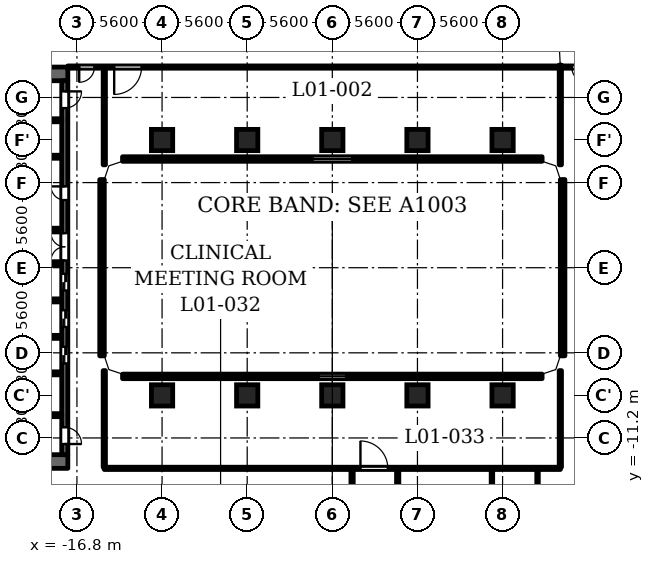
"""IFC4 building model, lengths in metres.
Left out: names, types, materials, properties, quantities, classifications, styles, units other than length and angle.
Written with IfcOpenShell. Run it as: python <this file> out.ifc"""

import sys

from ifc_helpers import new_model, si_unit, direction, frame, frame_2d, origin, origin_2d, place, context, subcontext, project, spatial, polyline, rectangle, outline, extrude, element, fill, save


model = new_model("IFC4")
c1 = context("Model", 3, precision=1e-05, world=origin(), true_north=direction((0.0, 1.0)))
c2 = subcontext(c1, "Body", "Model", "MODEL_VIEW")
j1 = project(units=[si_unit("LENGTHUNIT", "METRE"), si_unit("PLANEANGLEUNIT", "RADIAN")], contexts=[c1])
p1 = place(None, origin())
s1 = spatial("IfcSite", under=j1, at=p1, CompositionType="ELEMENT")
p2 = place(p1, origin())
s2 = spatial("IfcBuilding", under=s1, at=p2, CompositionType="ELEMENT")
p3 = place(p2, frame((0.0, 0.0, 6.5)))
s3 = spatial("IfcBuildingStorey", under=s2, at=p3, CompositionType="ELEMENT", Elevation=6.5)
for number, where, z_axis, x_axis in (
    (1, (-11.2, -8.4, 0.0), (0.0, 0.0, 1.0), (1.0, 0.0, 0.0)),
    (2, (-11.2, 8.4, 0.0), (0.0, 0.0, 1.0), (1.0, 0.0, 0.0)),
    (3, (-5.6, -8.4, 0.0), (0.0, 0.0, 1.0), (1.0, 0.0, 0.0)),
    (4, (-5.6, 8.4, 0.0), (0.0, 0.0, 1.0), (1.0, 0.0, 0.0)),
    (5, (0.0, -8.4, 0.0), (0.0, 0.0, 1.0), (1.0, 0.0, 0.0)),
    (6, (0.0, 8.4, 0.0), (0.0, 0.0, 1.0), (1.0, 0.0, 0.0)),
    (7, (5.6, -8.4, 0.0), (0.0, 0.0, 1.0), (1.0, 0.0, 0.0)),
    (8, (5.6, 8.4, 0.0), (0.0, 0.0, 1.0), (1.0, 0.0, 0.0)),
    (9, (11.2, -8.4, 0.0), (0.0, 0.0, 1.0), (1.0, 0.0, 0.0)),
    (10, (11.2, 8.4, 0.0), (0.0, 0.0, 1.0), (1.0, 0.0, 0.0)),
):
    element("IfcColumn", number, at=place(p3, frame(where, z_axis=z_axis, x_axis=x_axis)), inside=s3, PredefinedType="COLUMN", context=c2, shape_type="SweptSolid", body=[
        extrude(rectangle(XDim=1.4, YDim=1.4, at=origin_2d()), origin(), (0.0, 0.0, 1.0), 4.8),
    ])
p4 = place(p3, frame((-15.15, -5.8, 0.0), z_axis=(0.0, 0.0, 1.0), x_axis=(0.0, 1.0, 0.0)))
e11 = element("IfcWall", 11, at=p4, inside=s3, PredefinedType="SOLIDWALL", context=c2, shape_type="SweptSolid", body=[
    extrude(rectangle(XDim=11.6, YDim=0.3, at=frame_2d((5.8, 0.0))), origin(), (0.0, 0.0, 1.0), 4.45),
])
p5 = place(p3, frame((-13.8, 7.15, 0.0), z_axis=(0.0, 0.0, 1.0), x_axis=(1.0, 0.0, 0.0)))
e12 = element("IfcWall", 12, at=p5, inside=s3, PredefinedType="SOLIDWALL", context=c2, shape_type="SweptSolid", body=[
    extrude(rectangle(XDim=27.6, YDim=0.3, at=frame_2d((13.8, 0.0))), origin(), (0.0, 0.0, 1.0), 4.45),
])
p6 = place(p5, frame((12.5, 0.0, 0.9)))
e13 = element("IfcOpeningElement", 13, at=p6, cuts=e12, PredefinedType="OPENING", context=c2, shape_type="SweptSolid", body=[
    extrude(rectangle(XDim=2.6, YDim=1.25, at=frame_2d((1.3, 0.625))), frame((0.0, 0.16, 0.0), z_axis=(0.0, -1.0, 0.0), x_axis=(1.0, 0.0, 0.0)), (0.0, 0.0, 1.0), 0.32),
])
p7 = place(p3, frame((15.15, 5.8, 0.0), z_axis=(0.0, 0.0, 1.0), x_axis=(0.0, -1.0, 0.0)))
e14 = element("IfcWall", 14, at=p7, inside=s3, PredefinedType="SOLIDWALL", context=c2, shape_type="SweptSolid", body=[
    extrude(rectangle(XDim=11.6, YDim=0.3, at=frame_2d((5.8, 0.0))), origin(), (0.0, 0.0, 1.0), 4.45),
])
p8 = place(p3, frame((13.8, -7.15, 0.0), z_axis=(0.0, 0.0, 1.0), x_axis=(-1.0, 0.0, 0.0)))
e15 = element("IfcWall", 15, at=p8, inside=s3, PredefinedType="SOLIDWALL", context=c2, shape_type="SweptSolid", body=[
    extrude(rectangle(XDim=27.6, YDim=0.3, at=frame_2d((13.8, 0.0))), origin(), (0.0, 0.0, 1.0), 4.45),
])
p9 = place(p8, frame((12.9, 0.0, 0.9)))
e16 = element("IfcOpeningElement", 16, at=p9, cuts=e15, PredefinedType="OPENING", context=c2, shape_type="SweptSolid", body=[
    extrude(rectangle(XDim=1.8, YDim=1.25, at=frame_2d((0.9, 0.625))), frame((0.0, 0.16, 0.0), z_axis=(0.0, -1.0, 0.0), x_axis=(1.0, 0.0, 0.0)), (0.0, 0.0, 1.0), 0.32),
])
for number, where, z_axis, x_axis in (
    (17, (-17.4, 12.75, 0.0), (0.0, 0.0, 1.0), (-1.0, 0.0, 0.0)),
    (18, (-17.4, -12.75, 0.0), (0.0, 0.0, 1.0), (-1.0, 0.0, 0.0)),
):
    element("IfcWall", number, at=place(p3, frame(where, z_axis=z_axis, x_axis=x_axis)), inside=s3, PredefinedType="SHEAR", context=c2, shape_type="SweptSolid", body=[
        extrude(rectangle(XDim=10.4, YDim=0.9, at=frame_2d((5.2, 0.0))), origin(), (0.0, 0.0, 1.0), 4.45),
    ])
p10 = place(p3, frame((-17.6, -12.3, 0.0), z_axis=(0.0, 0.0, 1.0), x_axis=(0.0, 1.0, 0.0)))
e19 = element("IfcWall", 19, at=p10, inside=s3, PredefinedType="SHEAR", context=c2, shape_type="SweptSolid", body=[
    extrude(rectangle(XDim=24.6, YDim=0.4, at=frame_2d((12.3, 0.0))), origin(), (0.0, 0.0, 1.0), 4.45),
])
p11 = place(p10, frame((6.0, 0.0, 0.0)))
e20 = element("IfcOpeningElement", 20, at=p11, cuts=e19, PredefinedType="OPENING", context=c2, shape_type="SweptSolid", body=[
    extrude(rectangle(XDim=1.1, YDim=2.1, at=frame_2d((0.55, 1.05))), frame((0.0, 0.21, 0.0), z_axis=(0.0, -1.0, 0.0), x_axis=(1.0, 0.0, 0.0)), (0.0, 0.0, 1.0), 0.42),
])
p12 = place(p10, frame((8.4, 0.0, 0.0)))
e21 = element("IfcOpeningElement", 21, at=p12, cuts=e19, PredefinedType="OPENING", context=c2, shape_type="SweptSolid", body=[
    extrude(rectangle(XDim=1.1, YDim=2.1, at=frame_2d((0.55, 1.05))), frame((0.0, 0.21, 0.0), z_axis=(0.0, -1.0, 0.0), x_axis=(1.0, 0.0, 0.0)), (0.0, 0.0, 1.0), 0.42),
])
p13 = place(p10, frame((10.8, 0.0, 0.0)))
e22 = element("IfcOpeningElement", 22, at=p13, cuts=e19, PredefinedType="OPENING", context=c2, shape_type="SweptSolid", body=[
    extrude(rectangle(XDim=1.1, YDim=2.1, at=frame_2d((0.55, 1.05))), frame((0.0, 0.21, 0.0), z_axis=(0.0, -1.0, 0.0), x_axis=(1.0, 0.0, 0.0)), (0.0, 0.0, 1.0), 0.42),
])
p14 = place(p10, frame((16.75, 0.0, 0.0)))
e23 = element("IfcOpeningElement", 23, at=p14, cuts=e19, PredefinedType="OPENING", context=c2, shape_type="SweptSolid", body=[
    extrude(rectangle(XDim=0.9, YDim=2.1, at=frame_2d((0.45, 1.05))), frame((0.0, 0.21, 0.0), z_axis=(0.0, -1.0, 0.0), x_axis=(1.0, 0.0, 0.0)), (0.0, 0.0, 1.0), 0.42),
])
p15 = place(p10, frame((22.8, 0.0, 0.0)))
e24 = element("IfcOpeningElement", 24, at=p15, cuts=e19, PredefinedType="OPENING", context=c2, shape_type="SweptSolid", body=[
    extrude(rectangle(XDim=1.1, YDim=2.1, at=frame_2d((0.55, 1.05))), frame((0.0, 0.21, 0.0), z_axis=(0.0, -1.0, 0.0), x_axis=(1.0, 0.0, 0.0)), (0.0, 0.0, 1.0), 0.42),
])
p16 = place(p10, frame((0.7, 0.0, 0.0)))
e25 = element("IfcOpeningElement", 25, at=p16, cuts=e19, PredefinedType="OPENING", context=c2, shape_type="SweptSolid", body=[
    extrude(rectangle(XDim=1.1, YDim=2.1, at=frame_2d((0.55, 1.05))), frame((0.0, 0.21, 0.0), z_axis=(0.0, -1.0, 0.0), x_axis=(1.0, 0.0, 0.0)), (0.0, 0.0, 1.0), 0.42),
])
p17 = place(p10, frame((12.775, 0.0, 0.0)))
e26 = element("IfcOpeningElement", 26, at=p17, cuts=e19, PredefinedType="OPENING", context=c2, shape_type="SweptSolid", body=[
    extrude(rectangle(XDim=1.8, YDim=2.1, at=frame_2d((0.9, 1.05))), frame((0.0, 0.21, 0.0), z_axis=(0.0, -1.0, 0.0), x_axis=(1.0, 0.0, 0.0)), (0.0, 0.0, 1.0), 0.42),
])
p18 = place(p3, frame((-17.8, -9.7, 0.0), z_axis=(0.0, 0.0, 1.0), x_axis=(-1.0, 0.0, 0.0)))
e27 = element("IfcWall", 27, at=p18, inside=s3, PredefinedType="SHEAR", context=c2, shape_type="SweptSolid", body=[
    extrude(rectangle(XDim=8.3, YDim=0.2, at=frame_2d((4.15, 0.0))), origin(), (0.0, 0.0, 1.0), 4.45),
])
p19 = place(p18, frame((0.85, 0.0, 0.0)))
e28 = element("IfcOpeningElement", 28, at=p19, cuts=e27, PredefinedType="OPENING", context=c2, shape_type="SweptSolid", body=[
    extrude(rectangle(XDim=1.1, YDim=2.1, at=frame_2d((0.55, 1.05))), frame((0.0, 0.11, 0.0), z_axis=(0.0, -1.0, 0.0), x_axis=(1.0, 0.0, 0.0)), (0.0, 0.0, 1.0), 0.22),
])
p20 = place(p18, frame((3.75, 0.0, 0.0)))
e29 = element("IfcOpeningElement", 29, at=p20, cuts=e27, PredefinedType="OPENING", context=c2, shape_type="SweptSolid", body=[
    extrude(rectangle(XDim=1.1, YDim=2.1, at=frame_2d((0.55, 1.05))), frame((0.0, 0.11, 0.0), z_axis=(0.0, -1.0, 0.0), x_axis=(1.0, 0.0, 0.0)), (0.0, 0.0, 1.0), 0.22),
])
for number, where, z_axis, x_axis in (
    (30, (-17.8, -6.95, 0.0), (0.0, 0.0, 1.0), (-1.0, 0.0, 0.0)),
    (31, (-17.8, -4.55, 0.0), (0.0, 0.0, 1.0), (-1.0, 0.0, 0.0)),
    (32, (-17.8, -2.15, 0.0), (0.0, 0.0, 1.0), (-1.0, 0.0, 0.0)),
):
    element("IfcWall", number, at=place(p3, frame(where, z_axis=z_axis, x_axis=x_axis)), inside=s3, PredefinedType="PARTITIONING", context=c2, shape_type="SweptSolid", body=[
        extrude(rectangle(XDim=2.8, YDim=0.2, at=frame_2d((1.4, 0.0))), origin(), (0.0, 0.0, 1.0), 4.45),
    ])
for number, where, z_axis, x_axis in (
    (33, (-17.8, 0.25, 0.0), (0.0, 0.0, 1.0), (-1.0, 0.0, 0.0)),
    (34, (-17.8, 2.5, 0.0), (0.0, 0.0, 1.0), (-1.0, 0.0, 0.0)),
):
    element("IfcWall", number, at=place(p3, frame(where, z_axis=z_axis, x_axis=x_axis)), inside=s3, PredefinedType="PARTITIONING", context=c2, shape_type="SweptSolid", body=[
        extrude(rectangle(XDim=3.0, YDim=0.2, at=frame_2d((1.5, 0.0))), origin(), (0.0, 0.0, 1.0), 4.45),
    ])
p21 = place(p3, frame((-17.8, 7.3, 0.0), z_axis=(0.0, 0.0, 1.0), x_axis=(-1.0, 0.0, 0.0)))
e35 = element("IfcWall", 35, at=p21, inside=s3, PredefinedType="PARTITIONING", context=c2, shape_type="SweptSolid", body=[
    extrude(rectangle(XDim=2.8, YDim=0.2, at=frame_2d((1.4, 0.0))), origin(), (0.0, 0.0, 1.0), 4.45),
])
p22 = place(p3, frame((-17.8, 9.7, 0.0), z_axis=(0.0, 0.0, 1.0), x_axis=(-1.0, 0.0, 0.0)))
e36 = element("IfcWall", 36, at=p22, inside=s3, PredefinedType="SHEAR", context=c2, shape_type="SweptSolid", body=[
    extrude(rectangle(XDim=8.3, YDim=0.2, at=frame_2d((4.15, 0.0))), origin(), (0.0, 0.0, 1.0), 4.45),
])
p23 = place(p22, frame((0.85, 0.0, 0.0)))
e37 = element("IfcOpeningElement", 37, at=p23, cuts=e36, PredefinedType="OPENING", context=c2, shape_type="SweptSolid", body=[
    extrude(rectangle(XDim=1.1, YDim=2.1, at=frame_2d((0.55, 1.05))), frame((0.0, 0.11, 0.0), z_axis=(0.0, -1.0, 0.0), x_axis=(1.0, 0.0, 0.0)), (0.0, 0.0, 1.0), 0.22),
])
p24 = place(p22, frame((3.75, 0.0, 0.0)))
e38 = element("IfcOpeningElement", 38, at=p24, cuts=e36, PredefinedType="OPENING", context=c2, shape_type="SweptSolid", body=[
    extrude(rectangle(XDim=1.1, YDim=2.1, at=frame_2d((0.55, 1.05))), frame((0.0, 0.11, 0.0), z_axis=(0.0, -1.0, 0.0), x_axis=(1.0, 0.0, 0.0)), (0.0, 0.0, 1.0), 0.22),
])
p25 = place(p3, frame((-15.005, -13.2, 0.0), z_axis=(0.0, 0.0, 1.0), x_axis=(1.0, 0.0, 0.0)))
e39 = element("IfcWall", 39, at=p25, inside=s3, PredefinedType="PARTITIONING", context=c2, shape_type="SweptSolid", body=[
    extrude(rectangle(XDim=30.01, YDim=0.15, at=frame_2d((15.005, 0.0))), origin(), (0.0, 0.0, 1.0), 4.45),
])
p26 = place(p25, frame((16.855, 0.0, 0.0)))
e40 = element("IfcOpeningElement", 40, at=p26, cuts=e39, PredefinedType="OPENING", context=c2, shape_type="SweptSolid", body=[
    extrude(rectangle(XDim=1.8, YDim=2.1, at=frame_2d((0.9, 1.05))), frame((0.0, 0.085, 0.0), z_axis=(0.0, -1.0, 0.0), x_axis=(1.0, 0.0, 0.0)), (0.0, 0.0, 1.0), 0.17),
])
p27 = place(p3, frame((-17.4, 13.2, 0.0), z_axis=(0.0, 0.0, 1.0), x_axis=(1.0, 0.0, 0.0)))
e41 = element("IfcWall", 41, at=p27, inside=s3, PredefinedType="PARTITIONING", context=c2, shape_type="SweptSolid", body=[
    extrude(rectangle(XDim=34.8, YDim=0.15, at=frame_2d((17.4, 0.0))), origin(), (0.0, 0.0, 1.0), 4.45),
])
p28 = place(p27, frame((3.05, 0.0, 0.0)))
e42 = element("IfcOpeningElement", 42, at=p28, cuts=e41, PredefinedType="OPENING", context=c2, shape_type="SweptSolid", body=[
    extrude(rectangle(XDim=1.8, YDim=2.1, at=frame_2d((0.9, 1.05))), frame((0.0, 0.085, 0.0), z_axis=(0.0, -1.0, 0.0), x_axis=(1.0, 0.0, 0.0)), (0.0, 0.0, 1.0), 0.17),
])
p29 = place(p27, frame((0.75, 0.0, 0.0)))
e43 = element("IfcOpeningElement", 43, at=p29, cuts=e41, PredefinedType="OPENING", context=c2, shape_type="SweptSolid", body=[
    extrude(rectangle(XDim=1.0, YDim=2.1, at=frame_2d((0.5, 1.05))), frame((0.0, 0.085, 0.0), z_axis=(0.0, -1.0, 0.0), x_axis=(1.0, 0.0, 0.0)), (0.0, 0.0, 1.0), 0.17),
])
p30 = place(p27, frame((33.15, 0.0, 0.0)))
e44 = element("IfcOpeningElement", 44, at=p30, cuts=e41, PredefinedType="OPENING", context=c2, shape_type="SweptSolid", body=[
    extrude(rectangle(XDim=1.0, YDim=2.1, at=frame_2d((0.5, 1.05))), frame((0.0, 0.085, 0.0), z_axis=(0.0, -1.0, 0.0), x_axis=(1.0, 0.0, 0.0)), (0.0, 0.0, 1.0), 0.17),
])
for number, where, z_axis, x_axis in (
    (45, (-15.0, -13.125, 0.0), (0.0, 0.0, 1.0), (0.0, 1.0, 0.0)),
    (46, (-15.0, 6.769, 0.0), (0.0, 0.0, 1.0), (0.0, 1.0, 0.0)),
):
    element("IfcWall", number, at=place(p3, frame(where, z_axis=z_axis, x_axis=x_axis)), inside=s3, PredefinedType="PARTITIONING", context=c2, shape_type="SweptSolid", body=[
        extrude(rectangle(XDim=6.356, YDim=0.15, at=frame_2d((3.178, 0.0))), origin(), (0.0, 0.0, 1.0), 4.45),
    ])
for number, where, z_axis, x_axis in (
    (47, (1.3, -22.325, 0.0), (0.0, 0.0, 1.0), (0.0, 1.0, 0.0)),
    (48, (4.3, -22.325, 0.0), (0.0, 0.0, 1.0), (0.0, 1.0, 0.0)),
):
    element("IfcWall", number, at=place(p3, frame(where, z_axis=z_axis, x_axis=x_axis)), inside=s3, PredefinedType="PARTITIONING", context=c2, shape_type="SweptSolid", body=[
        extrude(rectangle(XDim=9.05, YDim=0.15, at=frame_2d((4.525, 0.0))), origin(), (0.0, 0.0, 1.0), 4.45),
    ])
for number, where, z_axis, x_axis in (
    (49, (10.5, -22.325, 0.0), (0.0, 0.0, 1.0), (0.0, 1.0, 0.0)),
    (50, (13.5, -22.325, 0.0), (0.0, 0.0, 1.0), (0.0, 1.0, 0.0)),
):
    element("IfcWall", number, at=place(p3, frame(where, z_axis=z_axis, x_axis=x_axis)), inside=s3, PredefinedType="PARTITIONING", context=c2, shape_type="SweptSolid", body=[
        extrude(rectangle(XDim=9.05, YDim=0.1, at=frame_2d((4.525, 0.0))), origin(), (0.0, 0.0, 1.0), 4.45),
    ])
for number, where, z_axis, x_axis in (
    (51, (15.0, -13.125, 0.0), (0.0, 0.0, 1.0), (0.0, 1.0, 0.0)),
    (52, (15.0, 6.769, 0.0), (0.0, 0.0, 1.0), (0.0, 1.0, 0.0)),
):
    element("IfcWall", number, at=place(p3, frame(where, z_axis=z_axis, x_axis=x_axis)), inside=s3, PredefinedType="PARTITIONING", context=c2, shape_type="SweptSolid", body=[
        extrude(rectangle(XDim=6.356, YDim=0.15, at=frame_2d((3.178, 0.0))), origin(), (0.0, 0.0, 1.0), 4.45),
    ])
p31 = place(p3, origin())
e53 = element("IfcWall", 53, at=p31, inside=s3, PredefinedType="SOLIDWALL", context=c2, shape_type="SweptSolid", body=[
    extrude(outline(polyline([(-13.849, 7.3), (-14.937, 6.937), (-15.3, 5.849), (-15.3, 5.8), (-15.0, 5.8), (-14.7, 6.7), (-13.8, 7.0), (-13.8, 7.3), (-13.849, 7.3)])), origin(), (0.0, 0.0, 1.0), 4.45),
])
e54 = element("IfcWall", 54, at=p31, inside=s3, PredefinedType="SOLIDWALL", context=c2, shape_type="SweptSolid", body=[
    extrude(outline(polyline([(14.937, 6.937), (13.849, 7.3), (13.8, 7.3), (13.8, 7.0), (14.7, 6.7), (15.0, 5.8), (15.3, 5.8), (15.3, 5.849), (14.937, 6.937)])), origin(), (0.0, 0.0, 1.0), 4.45),
])
e55 = element("IfcWall", 55, at=p31, inside=s3, PredefinedType="SOLIDWALL", context=c2, shape_type="SweptSolid", body=[
    extrude(outline(polyline([(14.937, -6.937), (15.3, -5.849), (15.3, -5.8), (15.0, -5.8), (14.7, -6.7), (13.8, -7.0), (13.8, -7.3), (13.849, -7.3), (14.937, -6.937)])), origin(), (0.0, 0.0, 1.0), 4.45),
])
e56 = element("IfcWall", 56, at=p31, inside=s3, PredefinedType="SOLIDWALL", context=c2, shape_type="SweptSolid", body=[
    extrude(outline(polyline([(-14.937, -6.937), (-13.849, -7.3), (-13.8, -7.3), (-13.8, -7.0), (-14.7, -6.7), (-15.0, -5.8), (-15.3, -5.8), (-15.3, -5.849), (-14.937, -6.937)])), origin(), (0.0, 0.0, 1.0), 4.45),
])
p32 = place(p11, origin())
e57 = element("IfcDoor", 57, at=p32, inside=s3, OperationType="DOUBLE_DOOR_SLIDING", PredefinedType="DOOR", context=c2, shape_type="SweptSolid", body=[
    extrude(rectangle(XDim=1.1, YDim=2.1, at=frame_2d((0.55, 1.05))), frame((0.0, 0.025, 0.0), z_axis=(0.0, -1.0, 0.0), x_axis=(1.0, 0.0, 0.0)), (0.0, 0.0, 1.0), 0.05),
])
fill(e20, e57)
p33 = place(p12, origin())
e58 = element("IfcDoor", 58, at=p33, inside=s3, OperationType="DOUBLE_DOOR_SLIDING", PredefinedType="DOOR", context=c2, shape_type="SweptSolid", body=[
    extrude(rectangle(XDim=1.1, YDim=2.1, at=frame_2d((0.55, 1.05))), frame((0.0, 0.025, 0.0), z_axis=(0.0, -1.0, 0.0), x_axis=(1.0, 0.0, 0.0)), (0.0, 0.0, 1.0), 0.05),
])
fill(e21, e58)
p34 = place(p13, origin())
e59 = element("IfcDoor", 59, at=p34, inside=s3, OperationType="DOUBLE_DOOR_SLIDING", PredefinedType="DOOR", context=c2, shape_type="SweptSolid", body=[
    extrude(rectangle(XDim=1.1, YDim=2.1, at=frame_2d((0.55, 1.05))), frame((0.0, 0.025, 0.0), z_axis=(0.0, -1.0, 0.0), x_axis=(1.0, 0.0, 0.0)), (0.0, 0.0, 1.0), 0.05),
])
fill(e22, e59)
p35 = place(p14, origin())
e60 = element("IfcDoor", 60, at=p35, inside=s3, OperationType="SINGLE_SWING_LEFT", PredefinedType="DOOR", context=c2, shape_type="SweptSolid", body=[
    extrude(rectangle(XDim=0.9, YDim=2.1, at=frame_2d((0.45, 1.05))), frame((0.0, 0.025, 0.0), z_axis=(0.0, -1.0, 0.0), x_axis=(1.0, 0.0, 0.0)), (0.0, 0.0, 1.0), 0.05),
])
fill(e23, e60)
p36 = place(p15, origin())
e61 = element("IfcDoor", 61, at=p36, inside=s3, OperationType="SINGLE_SWING_RIGHT", PredefinedType="DOOR", context=c2, shape_type="SweptSolid", body=[
    extrude(rectangle(XDim=1.1, YDim=2.1, at=frame_2d((0.55, 1.05))), frame((0.0, 0.025, 0.0), z_axis=(0.0, -1.0, 0.0), x_axis=(1.0, 0.0, 0.0)), (0.0, 0.0, 1.0), 0.05),
])
fill(e24, e61)
p37 = place(p16, origin())
e62 = element("IfcDoor", 62, at=p37, inside=s3, OperationType="SINGLE_SWING_LEFT", PredefinedType="DOOR", context=c2, shape_type="SweptSolid", body=[
    extrude(rectangle(XDim=1.1, YDim=2.1, at=frame_2d((0.55, 1.05))), frame((0.0, 0.025, 0.0), z_axis=(0.0, -1.0, 0.0), x_axis=(1.0, 0.0, 0.0)), (0.0, 0.0, 1.0), 0.05),
])
fill(e25, e62)
p38 = place(p17, origin())
e63 = element("IfcDoor", 63, at=p38, inside=s3, OperationType="DOUBLE_DOOR_SINGLE_SWING", PredefinedType="DOOR", context=c2, shape_type="SweptSolid", body=[
    extrude(rectangle(XDim=1.8, YDim=2.1, at=frame_2d((0.9, 1.05))), frame((0.0, 0.025, 0.0), z_axis=(0.0, -1.0, 0.0), x_axis=(1.0, 0.0, 0.0)), (0.0, 0.0, 1.0), 0.05),
])
fill(e26, e63)
p39 = place(p28, origin())
e64 = element("IfcDoor", 64, at=p39, inside=s3, OperationType="SINGLE_SWING_LEFT", PredefinedType="DOOR", context=c2, shape_type="SweptSolid", body=[
    extrude(rectangle(XDim=1.8, YDim=2.1, at=frame_2d((0.9, 1.05))), frame((0.0, 0.025, 0.0), z_axis=(0.0, -1.0, 0.0), x_axis=(1.0, 0.0, 0.0)), (0.0, 0.0, 1.0), 0.05),
])
fill(e42, e64)
p40 = place(p29, origin())
e65 = element("IfcDoor", 65, at=p40, inside=s3, OperationType="SINGLE_SWING_LEFT", PredefinedType="DOOR", context=c2, shape_type="SweptSolid", body=[
    extrude(rectangle(XDim=1.0, YDim=2.1, at=frame_2d((0.5, 1.05))), frame((0.0, 0.025, 0.0), z_axis=(0.0, -1.0, 0.0), x_axis=(1.0, 0.0, 0.0)), (0.0, 0.0, 1.0), 0.05),
])
fill(e43, e65)
p41 = place(p30, origin())
e66 = element("IfcDoor", 66, at=p41, inside=s3, OperationType="SINGLE_SWING_RIGHT", PredefinedType="DOOR", context=c2, shape_type="SweptSolid", body=[
    extrude(rectangle(XDim=1.0, YDim=2.1, at=frame_2d((0.5, 1.05))), frame((0.0, 0.025, 0.0), z_axis=(0.0, -1.0, 0.0), x_axis=(1.0, 0.0, 0.0)), (0.0, 0.0, 1.0), 0.05),
])
fill(e44, e66)
p42 = place(p26, origin())
e67 = element("IfcDoor", 67, at=p42, inside=s3, OperationType="SINGLE_SWING_RIGHT", PredefinedType="DOOR", context=c2, shape_type="SweptSolid", body=[
    extrude(rectangle(XDim=1.8, YDim=2.1, at=frame_2d((0.9, 1.05))), frame((0.0, 0.025, 0.0), z_axis=(0.0, -1.0, 0.0), x_axis=(1.0, 0.0, 0.0)), (0.0, 0.0, 1.0), 0.05),
])
fill(e40, e67)
p43 = place(p6, origin())
e68 = element("IfcWindow", 68, at=p43, inside=s3, PartitioningType="SINGLE_PANEL", PredefinedType="WINDOW", context=c2, shape_type="SweptSolid", body=[
    extrude(rectangle(XDim=2.6, YDim=1.25, at=frame_2d((1.3, 0.625))), frame((0.0, 0.03, 0.0), z_axis=(0.0, -1.0, 0.0), x_axis=(1.0, 0.0, 0.0)), (0.0, 0.0, 1.0), 0.06),
])
fill(e13, e68)
p44 = place(p9, origin())
e69 = element("IfcWindow", 69, at=p44, inside=s3, PartitioningType="SINGLE_PANEL", PredefinedType="WINDOW", context=c2, shape_type="SweptSolid", body=[
    extrude(rectangle(XDim=1.8, YDim=1.25, at=frame_2d((0.9, 0.625))), frame((0.0, 0.03, 0.0), z_axis=(0.0, -1.0, 0.0), x_axis=(1.0, 0.0, 0.0)), (0.0, 0.0, 1.0), 0.06),
])
fill(e16, e69)
save(model, sys.argv[1])
